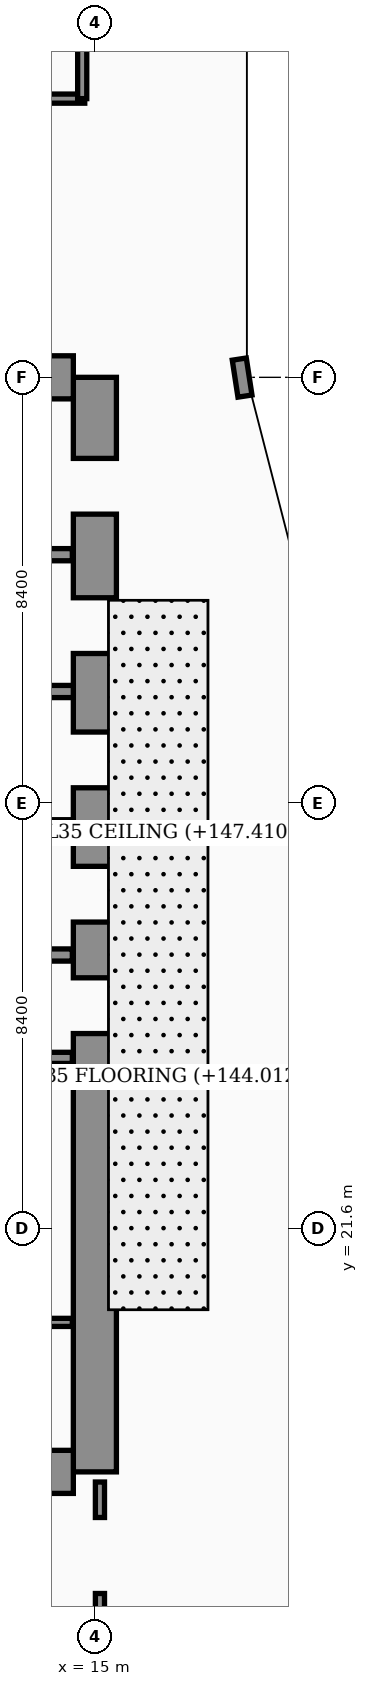
"""IFC4 building model, lengths in metres.
Left out: names, types, materials, properties, quantities, classifications, styles, units other than length and angle.
Written with IfcOpenShell. Run it as: python <this file> out.ifc"""

import sys

from ifc_helpers import new_model, si_unit, direction, frame, frame_2d, origin, place, context, subcontext, project, spatial, rectangle, extrude, element, fill, save


model = new_model("IFC4")
c1 = context("Model", 3, precision=1e-05, world=origin(), true_north=direction((0.0, 1.0)))
c2 = subcontext(c1, "Body", "Model", "MODEL_VIEW")
j1 = project(units=[si_unit("LENGTHUNIT", "METRE"), si_unit("PLANEANGLEUNIT", "RADIAN")], contexts=[c1])
p1 = place(None, origin())
s1 = spatial("IfcSite", under=j1, at=p1, CompositionType="ELEMENT")
p2 = place(p1, origin())
s2 = spatial("IfcBuilding", under=s1, at=p2, CompositionType="ELEMENT")
p3 = place(p2, frame((0.0, 0.0, 144.0)))
s3 = spatial("IfcBuildingStorey", under=s2, at=p3, CompositionType="ELEMENT", Elevation=144.0)
p4 = place(p3, frame((15.0, 16.8, 0.0), z_axis=(0.0, 0.0, 1.0), x_axis=(0.0, 1.0, 0.0)))
e1 = element("IfcWall", 1, at=p4, inside=s3, PredefinedType="SHEAR", context=c2, shape_type="SweptSolid", body=[
    extrude(rectangle(XDim=21.6, YDim=0.85, at=frame_2d((10.8, 0.0))), origin(), (0.0, 0.0, 1.0), 4.26),
])
p5 = place(p4, frame((8.65, 0.0, 0.0)))
e2 = element("IfcOpeningElement", 2, at=p5, cuts=e1, PredefinedType="OPENING", context=c2, shape_type="SweptSolid", body=[
    extrude(rectangle(XDim=1.1, YDim=2.2, at=frame_2d((0.55, 1.1))), frame((0.0, 0.435, 0.0), z_axis=(0.0, -1.0, 0.0), x_axis=(1.0, 0.0, 0.0)), (0.0, 0.0, 1.0), 0.87),
])
p6 = place(p4, frame((10.85, 0.0, 0.0)))
e3 = element("IfcOpeningElement", 3, at=p6, cuts=e1, PredefinedType="OPENING", context=c2, shape_type="SweptSolid", body=[
    extrude(rectangle(XDim=1.1, YDim=2.2, at=frame_2d((0.55, 1.1))), frame((0.0, 0.435, 0.0), z_axis=(0.0, -1.0, 0.0), x_axis=(1.0, 0.0, 0.0)), (0.0, 0.0, 1.0), 0.87),
])
p7 = place(p4, frame((13.5, 0.0, 0.0)))
e4 = element("IfcOpeningElement", 4, at=p7, cuts=e1, PredefinedType="OPENING", context=c2, shape_type="SweptSolid", body=[
    extrude(rectangle(XDim=1.1, YDim=2.2, at=frame_2d((0.55, 1.1))), frame((0.0, 0.435, 0.0), z_axis=(0.0, -1.0, 0.0), x_axis=(1.0, 0.0, 0.0)), (0.0, 0.0, 1.0), 0.87),
])
p8 = place(p4, frame((16.15, 0.0, 0.0)))
e5 = element("IfcOpeningElement", 5, at=p8, cuts=e1, PredefinedType="OPENING", context=c2, shape_type="SweptSolid", body=[
    extrude(rectangle(XDim=1.1, YDim=2.2, at=frame_2d((0.55, 1.1))), frame((0.0, 0.435, 0.0), z_axis=(0.0, -1.0, 0.0), x_axis=(1.0, 0.0, 0.0)), (0.0, 0.0, 1.0), 0.87),
])
p9 = place(p4, frame((18.9, 0.0, 0.0)))
e6 = element("IfcOpeningElement", 6, at=p9, cuts=e1, PredefinedType="OPENING", context=c2, shape_type="SweptSolid", body=[
    extrude(rectangle(XDim=1.1, YDim=2.2, at=frame_2d((0.55, 1.1))), frame((0.0, 0.435, 0.0), z_axis=(0.0, -1.0, 0.0), x_axis=(1.0, 0.0, 0.0)), (0.0, 0.0, 1.0), 0.87),
])
p10 = place(p3, frame((4.625, 38.4, 0.0), z_axis=(0.0, 0.0, 1.0), x_axis=(1.0, 0.0, 0.0)))
e7 = element("IfcWall", 7, at=p10, inside=s3, PredefinedType="SHEAR", context=c2, shape_type="SweptSolid", body=[
    extrude(rectangle(XDim=9.95, YDim=0.85, at=frame_2d((4.975, 0.0))), origin(), (0.0, 0.0, 1.0), 4.26),
])
p11 = place(p10, frame((5.68, 0.0, 0.0)))
e8 = element("IfcOpeningElement", 8, at=p11, cuts=e7, PredefinedType="OPENING", context=c2, shape_type="SweptSolid", body=[
    extrude(rectangle(XDim=1.1, YDim=2.2, at=frame_2d((0.55, 1.1))), frame((0.0, 0.435, 0.0), z_axis=(0.0, -1.0, 0.0), x_axis=(1.0, 0.0, 0.0)), (0.0, 0.0, 1.0), 0.87),
])
p12 = place(p3, frame((4.625, 16.8, 0.0), z_axis=(0.0, 0.0, 1.0), x_axis=(1.0, 0.0, 0.0)))
e9 = element("IfcWall", 9, at=p12, inside=s3, PredefinedType="SHEAR", context=c2, shape_type="SweptSolid", body=[
    extrude(rectangle(XDim=9.95, YDim=0.85, at=frame_2d((4.975, 0.0))), origin(), (0.0, 0.0, 1.0), 4.26),
])
for number, where, z_axis, x_axis in (
    (10, (12.18, 29.55, 0.0), (0.0, 0.0, 1.0), (1.0, 0.0, 0.0)),
    (11, (12.18, 32.2, 0.0), (0.0, 0.0, 1.0), (1.0, 0.0, 0.0)),
):
    element("IfcWall", number, at=place(p3, frame(where, z_axis=z_axis, x_axis=x_axis)), inside=s3, PredefinedType="SOLIDWALL", context=c2, shape_type="SweptSolid", body=[
        extrude(rectangle(XDim=2.395, YDim=0.24, at=frame_2d((1.198, 0.0))), origin(), (0.0, 0.0, 1.0), 4.26),
    ])
p13 = place(p3, frame((17.962, 38.03, 0.0), z_axis=(0.0, 0.0, 1.0), x_axis=(-0.15141125477, 0.988470855377, 0.0)))
e12 = element("IfcWall", 12, at=p13, inside=s3, PredefinedType="SOLIDWALL", context=c2, shape_type="SweptSolid", body=[
    extrude(rectangle(XDim=0.739, YDim=0.28, at=frame_2d((0.369, 0.0))), origin(), (0.0, 0.0, 1.0), 4.26),
])
p14 = place(p3, frame((9.68, 19.75, 0.0), z_axis=(0.0, 0.0, 1.0), x_axis=(1.0, 0.0, 0.0)))
e13 = element("IfcWall", 13, at=p14, inside=s3, PredefinedType="PARTITIONING", context=c2, shape_type="SweptSolid", body=[
    extrude(rectangle(XDim=4.875, YDim=0.16, at=frame_2d((2.438, 0.0))), origin(), (0.0, 0.0, 1.0), 4.26),
])
p15 = place(p14, frame((1.1, 0.0, 0.0)))
e14 = element("IfcOpeningElement", 14, at=p15, cuts=e13, PredefinedType="OPENING", context=c2, shape_type="SweptSolid", body=[
    extrude(rectangle(XDim=0.98, YDim=2.15, at=frame_2d((0.49, 1.075))), frame((0.0, 0.09, 0.0), z_axis=(0.0, -1.0, 0.0), x_axis=(1.0, 0.0, 0.0)), (0.0, 0.0, 1.0), 0.18),
])
p16 = place(p3, frame((9.68, 24.97, 0.0), z_axis=(0.0, 0.0, 1.0), x_axis=(1.0, 0.0, 0.0)))
e15 = element("IfcWall", 15, at=p16, inside=s3, PredefinedType="SOLIDWALL", context=c2, shape_type="SweptSolid", body=[
    extrude(rectangle(XDim=4.875, YDim=0.22, at=frame_2d((2.438, 0.0))), origin(), (0.0, 0.0, 1.0), 3.64),
])
p17 = place(p16, frame((0.9, 0.0, 0.0)))
e16 = element("IfcOpeningElement", 16, at=p17, cuts=e15, PredefinedType="OPENING", context=c2, shape_type="SweptSolid", body=[
    extrude(rectangle(XDim=0.98, YDim=2.15, at=frame_2d((0.49, 1.075))), frame((0.0, 0.12, 0.0), z_axis=(0.0, -1.0, 0.0), x_axis=(1.0, 0.0, 0.0)), (0.0, 0.0, 1.0), 0.24),
])
p18 = place(p3, frame((12.25, 27.0, 0.0), z_axis=(0.0, 0.0, 1.0), x_axis=(1.0, 0.0, 0.0)))
e17 = element("IfcWall", 17, at=p18, inside=s3, PredefinedType="SOLIDWALL", context=c2, shape_type="SweptSolid", body=[
    extrude(rectangle(XDim=2.305, YDim=0.24, at=frame_2d((1.152, 0.0))), origin(), (0.0, 0.0, 1.0), 4.26),
])
p19 = place(p3, frame((9.66, 34.9, 0.0), z_axis=(0.0, 0.0, 1.0), x_axis=(1.0, 0.0, 0.0)))
e18 = element("IfcWall", 18, at=p19, inside=s3, PredefinedType="SOLIDWALL", context=c2, shape_type="SweptSolid", body=[
    extrude(rectangle(XDim=4.895, YDim=0.24, at=frame_2d((2.448, 0.0))), origin(), (0.0, 0.0, 1.0), 4.26),
])
p20 = place(p3, frame((4.06, 43.9, 0.0), z_axis=(0.0, 0.0, 1.0), x_axis=(1.0, 0.0, 0.0)))
e19 = element("IfcWall", 19, at=p20, inside=s3, PredefinedType="PARTITIONING", context=c2, shape_type="SweptSolid", body=[
    extrude(rectangle(XDim=10.74, YDim=0.18, at=frame_2d((5.37, 0.0))), origin(), (0.0, 0.0, 1.0), 3.64),
])
p21 = place(p20, frame((0.55, 0.0, 0.0)))
e20 = element("IfcOpeningElement", 20, at=p21, cuts=e19, PredefinedType="OPENING", context=c2, shape_type="SweptSolid", body=[
    extrude(rectangle(XDim=1.02, YDim=2.2, at=frame_2d((0.51, 1.1))), frame((0.0, 0.1, 0.0), z_axis=(0.0, -1.0, 0.0), x_axis=(1.0, 0.0, 0.0)), (0.0, 0.0, 1.0), 0.2),
])
p22 = place(p20, frame((4.65, 0.0, 0.0)))
e21 = element("IfcOpeningElement", 21, at=p22, cuts=e19, PredefinedType="OPENING", context=c2, shape_type="SweptSolid", body=[
    extrude(rectangle(XDim=1.02, YDim=2.2, at=frame_2d((0.51, 1.1))), frame((0.0, 0.1, 0.0), z_axis=(0.0, -1.0, 0.0), x_axis=(1.0, 0.0, 0.0)), (0.0, 0.0, 1.0), 0.2),
])
p23 = place(p20, frame((8.4, 0.0, 0.0)))
e22 = element("IfcOpeningElement", 22, at=p23, cuts=e19, PredefinedType="OPENING", context=c2, shape_type="SweptSolid", body=[
    extrude(rectangle(XDim=1.02, YDim=2.2, at=frame_2d((0.51, 1.1))), frame((0.0, 0.1, 0.0), z_axis=(0.0, -1.0, 0.0), x_axis=(1.0, 0.0, 0.0)), (0.0, 0.0, 1.0), 0.2),
])
p24 = place(p3, frame((14.75, 43.9, 0.0), z_axis=(0.0, 0.0, 1.0), x_axis=(0.0, 1.0, 0.0)))
e23 = element("IfcWall", 23, at=p24, inside=s3, PredefinedType="PARTITIONING", context=c2, shape_type="SweptSolid", body=[
    extrude(rectangle(XDim=3.82, YDim=0.18, at=frame_2d((1.91, 0.0))), origin(), (0.0, 0.0, 1.0), 3.74),
])
p25 = place(p3, frame((15.1, 2.6, 0.0), z_axis=(0.0, 0.0, 1.0), x_axis=(0.0, 1.0, 0.0)))
e24 = element("IfcWall", 24, at=p25, inside=s3, PredefinedType="PARTITIONING", context=c2, shape_type="SweptSolid", body=[
    extrude(rectangle(XDim=14.0, YDim=0.18, at=frame_2d((7.0, 0.0))), origin(), (0.0, 0.0, 1.0), 3.19),
])
p26 = place(p25, frame((11.8, 0.0, 0.0)))
e25 = element("IfcOpeningElement", 25, at=p26, cuts=e24, PredefinedType="OPENING", context=c2, shape_type="SweptSolid", body=[
    extrude(rectangle(XDim=1.5, YDim=2.22, at=frame_2d((0.75, 1.11))), frame((0.0, 0.1, 0.0), z_axis=(0.0, -1.0, 0.0), x_axis=(1.0, 0.0, 0.0)), (0.0, 0.0, 1.0), 0.2),
])
p27 = place(p26, origin())
e26 = element("IfcDoor", 26, at=p27, inside=s3, OperationType="SINGLE_SWING_LEFT", PredefinedType="DOOR", context=c2, shape_type="SweptSolid", body=[
    extrude(rectangle(XDim=1.5, YDim=2.22, at=frame_2d((0.75, 1.11))), frame((0.0, 0.025, 0.0), z_axis=(0.0, -1.0, 0.0), x_axis=(1.0, 0.0, 0.0)), (0.0, 0.0, 1.0), 0.05),
])
fill(e25, e26)
p28 = place(p5, origin())
e27 = element("IfcDoor", 27, at=p28, inside=s3, OperationType="SINGLE_SWING_RIGHT", PredefinedType="DOOR", context=c2, shape_type="SweptSolid", body=[
    extrude(rectangle(XDim=1.1, YDim=2.2, at=frame_2d((0.55, 1.1))), frame((0.0, 0.025, 0.0), z_axis=(0.0, -1.0, 0.0), x_axis=(1.0, 0.0, 0.0)), (0.0, 0.0, 1.0), 0.05),
])
fill(e2, e27)
p29 = place(p6, origin())
e28 = element("IfcDoor", 28, at=p29, inside=s3, OperationType="DOUBLE_DOOR_SLIDING", PredefinedType="DOOR", context=c2, shape_type="SweptSolid", body=[
    extrude(rectangle(XDim=1.1, YDim=2.2, at=frame_2d((0.55, 1.1))), frame((0.0, 0.025, 0.0), z_axis=(0.0, -1.0, 0.0), x_axis=(1.0, 0.0, 0.0)), (0.0, 0.0, 1.0), 0.05),
])
fill(e3, e28)
p30 = place(p7, origin())
e29 = element("IfcDoor", 29, at=p30, inside=s3, OperationType="DOUBLE_DOOR_SLIDING", PredefinedType="DOOR", context=c2, shape_type="SweptSolid", body=[
    extrude(rectangle(XDim=1.1, YDim=2.2, at=frame_2d((0.55, 1.1))), frame((0.0, 0.025, 0.0), z_axis=(0.0, -1.0, 0.0), x_axis=(1.0, 0.0, 0.0)), (0.0, 0.0, 1.0), 0.05),
])
fill(e4, e29)
p31 = place(p8, origin())
e30 = element("IfcDoor", 30, at=p31, inside=s3, OperationType="DOUBLE_DOOR_SLIDING", PredefinedType="DOOR", context=c2, shape_type="SweptSolid", body=[
    extrude(rectangle(XDim=1.1, YDim=2.2, at=frame_2d((0.55, 1.1))), frame((0.0, 0.025, 0.0), z_axis=(0.0, -1.0, 0.0), x_axis=(1.0, 0.0, 0.0)), (0.0, 0.0, 1.0), 0.05),
])
fill(e5, e30)
p32 = place(p9, origin())
e31 = element("IfcDoor", 31, at=p32, inside=s3, OperationType="DOUBLE_DOOR_SLIDING", PredefinedType="DOOR", context=c2, shape_type="SweptSolid", body=[
    extrude(rectangle(XDim=1.1, YDim=2.2, at=frame_2d((0.55, 1.1))), frame((0.0, 0.025, 0.0), z_axis=(0.0, -1.0, 0.0), x_axis=(1.0, 0.0, 0.0)), (0.0, 0.0, 1.0), 0.05),
])
fill(e6, e31)
save(model, sys.argv[1])
